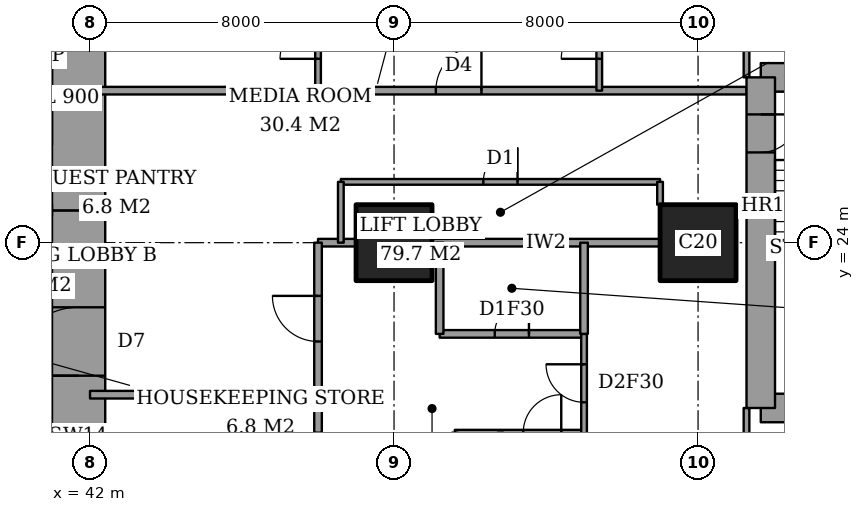
"""IFC4 building model, lengths in metres.
Left out: names, types, materials, properties, quantities, classifications, styles, units other than length and angle.
Written with IfcOpenShell. Run it as: python <this file> out.ifc"""

import sys

from ifc_helpers import new_model, si_unit, direction, frame, frame_2d, origin, origin_2d, place, context, subcontext, project, spatial, rectangle, extrude, element, fill, save


model = new_model("IFC4")
c1 = context("Model", 3, precision=1e-05, world=origin(), true_north=direction((0.0, 1.0)))
c2 = subcontext(c1, "Body", "Model", "MODEL_VIEW")
j1 = project(units=[si_unit("LENGTHUNIT", "METRE"), si_unit("PLANEANGLEUNIT", "RADIAN")], contexts=[c1])
p1 = place(None, origin())
s1 = spatial("IfcSite", under=j1, at=p1, CompositionType="ELEMENT")
p2 = place(p1, origin())
s2 = spatial("IfcBuilding", under=s1, at=p2, CompositionType="ELEMENT")
p3 = place(p2, frame((0.0, 0.0, 139.4)))
s3 = spatial("IfcBuildingStorey", under=s2, at=p3, CompositionType="ELEMENT", Elevation=139.4)
for number, where, z_axis, x_axis in (
    (1, (50.0, 24.0, 0.0), (0.0, 0.0, 1.0), (1.0, 0.0, 0.0)),
    (2, (58.0, 24.0, 0.0), (0.0, 0.0, 1.0), (1.0, 0.0, 0.0)),
):
    element("IfcColumn", number, at=place(p3, frame(where, z_axis=z_axis, x_axis=x_axis)), inside=s3, PredefinedType="COLUMN", context=c2, shape_type="SweptSolid", body=[
        extrude(rectangle(XDim=2.0, YDim=2.0, at=origin_2d()), origin(), (0.0, 0.0, 1.0), 3.6),
    ])
p4 = place(p3, frame((41.7, 13.0, 0.0), z_axis=(0.0, 0.0, 1.0), x_axis=(0.0, 1.0, 0.0)))
e3 = element("IfcWall", 3, at=p4, inside=s3, PredefinedType="SHEAR", context=c2, shape_type="SweptSolid", body=[
    extrude(rectangle(XDim=11.85, YDim=1.4, at=frame_2d((5.925, 0.0))), origin(), (0.0, 0.0, 1.0), 3.6),
])
p5 = place(p4, frame((7.5, 0.0, 0.0)))
e4 = element("IfcOpeningElement", 4, at=p5, cuts=e3, PredefinedType="OPENING", context=c2, shape_type="SweptSolid", body=[
    extrude(rectangle(XDim=1.8, YDim=2.4, at=frame_2d((0.9, 1.2))), frame((0.0, 0.71, 0.0), z_axis=(0.0, -1.0, 0.0), x_axis=(1.0, 0.0, 0.0)), (0.0, 0.0, 1.0), 1.42),
])
p6 = place(p3, frame((41.7, 24.85, 0.0), z_axis=(0.0, 0.0, 1.0), x_axis=(0.0, 1.0, 0.0)))
e5 = element("IfcWall", 5, at=p6, inside=s3, PredefinedType="SHEAR", context=c2, shape_type="SweptSolid", body=[
    extrude(rectangle(XDim=10.15, YDim=1.4, at=frame_2d((5.075, 0.0))), origin(), (0.0, 0.0, 1.0), 3.6),
])
for number, where, z_axis, x_axis in (
    (6, (59.65, 19.65, 0.0), (0.0, 0.0, 1.0), (1.0, 0.0, 0.0)),
    (7, (64.1, 28.35, 0.0), (0.0, 0.0, 1.0), (-1.0, 0.0, 0.0)),
):
    element("IfcWall", number, at=place(p3, frame(where, z_axis=z_axis, x_axis=x_axis)), inside=s3, PredefinedType="SHEAR", context=c2, shape_type="SweptSolid", body=[
        extrude(rectangle(XDim=4.45, YDim=0.75, at=frame_2d((2.225, 0.0))), origin(), (0.0, 0.0, 1.0), 3.6),
    ])
p7 = place(p3, frame((59.65, 28.35, 0.0), z_axis=(0.0, 0.0, 1.0), x_axis=(0.0, -1.0, 0.0)))
e8 = element("IfcWall", 8, at=p7, inside=s3, PredefinedType="SHEAR", context=c2, shape_type="SweptSolid", body=[
    extrude(rectangle(XDim=8.7, YDim=0.75, at=frame_2d((4.35, 0.0))), origin(), (0.0, 0.0, 1.0), 3.6),
])
p8 = place(p7, frame((0.975, 0.0, 0.0)))
e9 = element("IfcOpeningElement", 9, at=p8, cuts=e8, PredefinedType="OPENING", context=c2, shape_type="SweptSolid", body=[
    extrude(rectangle(XDim=1.0, YDim=2.1, at=frame_2d((0.5, 1.05))), frame((0.0, 0.385, 0.0), z_axis=(0.0, -1.0, 0.0), x_axis=(1.0, 0.0, 0.0)), (0.0, 0.0, 1.0), 0.77),
])
p9 = place(p3, frame((51.6, 19.0, 0.0), z_axis=(0.0, 0.0, 1.0), x_axis=(1.0, 0.0, 0.0)))
e10 = element("IfcWall", 10, at=p9, inside=s3, PredefinedType="PARTITIONING", context=c2, shape_type="SweptSolid", body=[
    extrude(rectangle(XDim=3.4, YDim=0.15, at=frame_2d((1.7, 0.0))), origin(), (0.0, 0.0, 1.0), 3.35),
])
p10 = place(p9, frame((1.8, 0.0, 0.0)))
e11 = element("IfcOpeningElement", 11, at=p10, cuts=e10, PredefinedType="OPENING", context=c2, shape_type="SweptSolid", body=[
    extrude(rectangle(XDim=1.0, YDim=2.1, at=frame_2d((0.5, 1.05))), frame((0.0, 0.085, 0.0), z_axis=(0.0, -1.0, 0.0), x_axis=(1.0, 0.0, 0.0)), (0.0, 0.0, 1.0), 0.17),
])
p11 = place(p3, frame((42.0, 20.0, 0.0), z_axis=(0.0, 0.0, 1.0), x_axis=(1.0, 0.0, 0.0)))
e12 = element("IfcWall", 12, at=p11, inside=s3, PredefinedType="PARTITIONING", context=c2, shape_type="SweptSolid", body=[
    extrude(rectangle(XDim=6.0, YDim=0.2, at=frame_2d((3.0, 0.0))), origin(), (0.0, 0.0, 1.0), 3.35),
])
p12 = place(p3, frame((51.2, 21.6, 0.0), z_axis=(0.0, 0.0, 1.0), x_axis=(1.0, 0.0, 0.0)))
e13 = element("IfcWall", 13, at=p12, inside=s3, PredefinedType="PARTITIONING", context=c2, shape_type="SweptSolid", body=[
    extrude(rectangle(XDim=3.8, YDim=0.2, at=frame_2d((1.9, 0.0))), origin(), (0.0, 0.0, 1.0), 3.35),
])
p13 = place(p12, frame((1.45, 0.0, 0.0)))
e14 = element("IfcOpeningElement", 14, at=p13, cuts=e13, PredefinedType="OPENING", context=c2, shape_type="SweptSolid", body=[
    extrude(rectangle(XDim=0.9, YDim=2.1, at=frame_2d((0.45, 1.05))), frame((0.0, 0.11, 0.0), z_axis=(0.0, -1.0, 0.0), x_axis=(1.0, 0.0, 0.0)), (0.0, 0.0, 1.0), 0.22),
])
p14 = place(p3, frame((48.0, 24.0, 0.0), z_axis=(0.0, 0.0, 1.0), x_axis=(1.0, 0.0, 0.0)))
e15 = element("IfcWall", 15, at=p14, inside=s3, PredefinedType="PARTITIONING", context=c2, shape_type="SweptSolid", body=[
    extrude(rectangle(XDim=1.0, YDim=0.2, at=frame_2d((0.5, 0.0))), origin(), (0.0, 0.0, 1.0), 3.35),
])
p15 = place(p3, frame((51.0, 24.0, 0.0), z_axis=(0.0, 0.0, 1.0), x_axis=(1.0, 0.0, 0.0)))
e16 = element("IfcWall", 16, at=p15, inside=s3, PredefinedType="PARTITIONING", context=c2, shape_type="SweptSolid", body=[
    extrude(rectangle(XDim=6.0, YDim=0.2, at=frame_2d((3.0, 0.0))), origin(), (0.0, 0.0, 1.0), 3.35),
])
p16 = place(p3, frame((48.6, 25.6, 0.0), z_axis=(0.0, 0.0, 1.0), x_axis=(1.0, 0.0, 0.0)))
e17 = element("IfcWall", 17, at=p16, inside=s3, PredefinedType="PARTITIONING", context=c2, shape_type="SweptSolid", body=[
    extrude(rectangle(XDim=8.4, YDim=0.15, at=frame_2d((4.2, 0.0))), origin(), (0.0, 0.0, 1.0), 3.35),
])
p17 = place(p16, frame((3.75, 0.0, 0.0)))
e18 = element("IfcOpeningElement", 18, at=p17, cuts=e17, PredefinedType="OPENING", context=c2, shape_type="SweptSolid", body=[
    extrude(rectangle(XDim=0.9, YDim=2.1, at=frame_2d((0.45, 1.05))), frame((0.0, 0.085, 0.0), z_axis=(0.0, -1.0, 0.0), x_axis=(1.0, 0.0, 0.0)), (0.0, 0.0, 1.0), 0.17),
])
p18 = place(p3, frame((42.0, 28.0, 0.0), z_axis=(0.0, 0.0, 1.0), x_axis=(1.0, 0.0, 0.0)))
e19 = element("IfcWall", 19, at=p18, inside=s3, PredefinedType="PARTITIONING", context=c2, shape_type="SweptSolid", body=[
    extrude(rectangle(XDim=17.275, YDim=0.2, at=frame_2d((8.637, 0.0))), origin(), (0.0, 0.0, 1.0), 3.35),
])
p19 = place(p18, frame((9.1, 0.0, 0.0)))
e20 = element("IfcOpeningElement", 20, at=p19, cuts=e19, PredefinedType="OPENING", context=c2, shape_type="SweptSolid", body=[
    extrude(rectangle(XDim=1.2, YDim=2.4, at=frame_2d((0.6, 1.2))), frame((0.0, 0.11, 0.0), z_axis=(0.0, -1.0, 0.0), x_axis=(1.0, 0.0, 0.0)), (0.0, 0.0, 1.0), 0.22),
])
p20 = place(p3, frame((48.0, 19.0, 0.0), z_axis=(0.0, 0.0, 1.0), x_axis=(0.0, 1.0, 0.0)))
e21 = element("IfcWall", 21, at=p20, inside=s3, PredefinedType="PARTITIONING", context=c2, shape_type="SweptSolid", body=[
    extrude(rectangle(XDim=5.0, YDim=0.2, at=frame_2d((2.5, 0.0))), origin(), (0.0, 0.0, 1.0), 3.35),
])
p21 = place(p20, frame((2.4, 0.0, 0.0)))
e22 = element("IfcOpeningElement", 22, at=p21, cuts=e21, PredefinedType="OPENING", context=c2, shape_type="SweptSolid", body=[
    extrude(rectangle(XDim=1.2, YDim=2.4, at=frame_2d((0.6, 1.2))), frame((0.0, 0.11, 0.0), z_axis=(0.0, -1.0, 0.0), x_axis=(1.0, 0.0, 0.0)), (0.0, 0.0, 1.0), 0.22),
])
p22 = place(p3, frame((48.0, 28.0, 0.0), z_axis=(0.0, 0.0, 1.0), x_axis=(0.0, 1.0, 0.0)))
e23 = element("IfcWall", 23, at=p22, inside=s3, PredefinedType="PARTITIONING", context=c2, shape_type="SweptSolid", body=[
    extrude(rectangle(XDim=9.4, YDim=0.15, at=frame_2d((4.7, 0.0))), origin(), (0.0, 0.0, 1.0), 3.35),
])
p23 = place(p22, frame((0.837, 0.0, 0.0)))
e24 = element("IfcOpeningElement", 24, at=p23, cuts=e23, PredefinedType="OPENING", context=c2, shape_type="SweptSolid", body=[
    extrude(rectangle(XDim=1.0, YDim=2.1, at=frame_2d((0.5, 1.05))), frame((0.0, 0.085, 0.0), z_axis=(0.0, -1.0, 0.0), x_axis=(1.0, 0.0, 0.0)), (0.0, 0.0, 1.0), 0.17),
])
p24 = place(p3, frame((48.6, 24.0, 0.0), z_axis=(0.0, 0.0, 1.0), x_axis=(0.0, 1.0, 0.0)))
e25 = element("IfcWall", 25, at=p24, inside=s3, PredefinedType="PARTITIONING", context=c2, shape_type="SweptSolid", body=[
    extrude(rectangle(XDim=1.6, YDim=0.15, at=frame_2d((0.8, 0.0))), origin(), (0.0, 0.0, 1.0), 3.35),
])
p25 = place(p3, frame((51.2, 21.6, 0.0), z_axis=(0.0, 0.0, 1.0), x_axis=(0.0, 1.0, 0.0)))
e26 = element("IfcWall", 26, at=p25, inside=s3, PredefinedType="PARTITIONING", context=c2, shape_type="SweptSolid", body=[
    extrude(rectangle(XDim=2.4, YDim=0.2, at=frame_2d((1.2, 0.0))), origin(), (0.0, 0.0, 1.0), 3.35),
])
p26 = place(p3, frame((51.6, 16.05, 0.0), z_axis=(0.0, 0.0, 1.0), x_axis=(0.0, 1.0, 0.0)))
e27 = element("IfcWall", 27, at=p26, inside=s3, PredefinedType="PARTITIONING", context=c2, shape_type="SweptSolid", body=[
    extrude(rectangle(XDim=2.95, YDim=0.15, at=frame_2d((1.475, 0.0))), origin(), (0.0, 0.0, 1.0), 3.35),
])
p27 = place(p3, frame((55.0, 21.6, 0.0), z_axis=(0.0, 0.0, 1.0), x_axis=(0.0, 1.0, 0.0)))
e28 = element("IfcWall", 28, at=p27, inside=s3, PredefinedType="PARTITIONING", context=c2, shape_type="SweptSolid", body=[
    extrude(rectangle(XDim=2.4, YDim=0.2, at=frame_2d((1.2, 0.0))), origin(), (0.0, 0.0, 1.0), 3.35),
])
p28 = place(p3, frame((55.0, 10.6, 0.0), z_axis=(0.0, 0.0, 1.0), x_axis=(0.0, 1.0, 0.0)))
e29 = element("IfcWall", 29, at=p28, inside=s3, PredefinedType="PARTITIONING", context=c2, shape_type="SweptSolid", body=[
    extrude(rectangle(XDim=11.0, YDim=0.15, at=frame_2d((5.5, 0.0))), origin(), (0.0, 0.0, 1.0), 3.35),
])
p29 = place(p28, frame((9.2, 0.0, 0.0)))
e30 = element("IfcOpeningElement", 30, at=p29, cuts=e29, PredefinedType="OPENING", context=c2, shape_type="SweptSolid", body=[
    extrude(rectangle(XDim=1.0, YDim=2.1, at=frame_2d((0.5, 1.05))), frame((0.0, 0.085, 0.0), z_axis=(0.0, -1.0, 0.0), x_axis=(1.0, 0.0, 0.0)), (0.0, 0.0, 1.0), 0.17),
])
p30 = place(p3, frame((55.4, 28.0, 0.0), z_axis=(0.0, 0.0, 1.0), x_axis=(0.0, 1.0, 0.0)))
e31 = element("IfcWall", 31, at=p30, inside=s3, PredefinedType="PARTITIONING", context=c2, shape_type="SweptSolid", body=[
    extrude(rectangle(XDim=9.4, YDim=0.15, at=frame_2d((4.7, 0.0))), origin(), (0.0, 0.0, 1.0), 3.35),
])
p31 = place(p30, frame((0.837, 0.0, 0.0)))
e32 = element("IfcOpeningElement", 32, at=p31, cuts=e31, PredefinedType="OPENING", context=c2, shape_type="SweptSolid", body=[
    extrude(rectangle(XDim=1.0, YDim=2.1, at=frame_2d((0.5, 1.05))), frame((0.0, 0.085, 0.0), z_axis=(0.0, -1.0, 0.0), x_axis=(1.0, 0.0, 0.0)), (0.0, 0.0, 1.0), 0.17),
])
p32 = place(p3, frame((57.0, 25.0, 0.0), z_axis=(0.0, 0.0, 1.0), x_axis=(0.0, 1.0, 0.0)))
e33 = element("IfcWall", 33, at=p32, inside=s3, PredefinedType="PARTITIONING", context=c2, shape_type="SweptSolid", body=[
    extrude(rectangle(XDim=0.6, YDim=0.15, at=frame_2d((0.3, 0.0))), origin(), (0.0, 0.0, 1.0), 3.35),
])
p33 = place(p3, frame((59.275, 17.2, 0.0), z_axis=(0.0, 0.0, 1.0), x_axis=(0.0, 1.0, 0.0)))
e34 = element("IfcWall", 34, at=p33, inside=s3, PredefinedType="PARTITIONING", context=c2, shape_type="SweptSolid", body=[
    extrude(rectangle(XDim=2.45, YDim=0.15, at=frame_2d((1.225, 0.0))), origin(), (0.0, 0.0, 1.0), 3.35),
])
p34 = place(p33, frame((0.538, 0.0, 0.0)))
e35 = element("IfcOpeningElement", 35, at=p34, cuts=e34, PredefinedType="OPENING", context=c2, shape_type="SweptSolid", body=[
    extrude(rectangle(XDim=1.0, YDim=2.1, at=frame_2d((0.5, 1.05))), frame((0.0, 0.085, 0.0), z_axis=(0.0, -1.0, 0.0), x_axis=(1.0, 0.0, 0.0)), (0.0, 0.0, 1.0), 0.17),
])
p35 = place(p3, frame((59.275, 28.35, 0.0), z_axis=(0.0, 0.0, 1.0), x_axis=(0.0, 1.0, 0.0)))
e36 = element("IfcWall", 36, at=p35, inside=s3, PredefinedType="PARTITIONING", context=c2, shape_type="SweptSolid", body=[
    extrude(rectangle(XDim=2.45, YDim=0.15, at=frame_2d((1.225, 0.0))), origin(), (0.0, 0.0, 1.0), 3.35),
])
p36 = place(p35, frame((0.913, 0.0, 0.0)))
e37 = element("IfcOpeningElement", 37, at=p36, cuts=e36, PredefinedType="OPENING", context=c2, shape_type="SweptSolid", body=[
    extrude(rectangle(XDim=1.0, YDim=2.1, at=frame_2d((0.5, 1.05))), frame((0.0, 0.085, 0.0), z_axis=(0.0, -1.0, 0.0), x_axis=(1.0, 0.0, 0.0)), (0.0, 0.0, 1.0), 0.17),
])
p37 = place(p29, origin())
e38 = element("IfcDoor", 38, at=p37, inside=s3, OperationType="SINGLE_SWING_LEFT", PredefinedType="DOOR", context=c2, shape_type="SweptSolid", body=[
    extrude(rectangle(XDim=1.0, YDim=2.1, at=frame_2d((0.5, 1.05))), frame((0.0, 0.025, 0.0), z_axis=(0.0, -1.0, 0.0), x_axis=(1.0, 0.0, 0.0)), (0.0, 0.0, 1.0), 0.05),
])
fill(e30, e38)
p38 = place(p13, origin())
e39 = element("IfcDoor", 39, at=p38, inside=s3, OperationType="SINGLE_SWING_LEFT", PredefinedType="DOOR", context=c2, shape_type="SweptSolid", body=[
    extrude(rectangle(XDim=0.9, YDim=2.1, at=frame_2d((0.45, 1.05))), frame((0.0, 0.025, 0.0), z_axis=(0.0, -1.0, 0.0), x_axis=(1.0, 0.0, 0.0)), (0.0, 0.0, 1.0), 0.05),
])
fill(e14, e39)
p39 = place(p21, origin())
e40 = element("IfcDoor", 40, at=p39, inside=s3, OperationType="SINGLE_SWING_LEFT", PredefinedType="DOOR", context=c2, shape_type="SweptSolid", body=[
    extrude(rectangle(XDim=1.2, YDim=2.4, at=frame_2d((0.6, 1.2))), frame((0.0, 0.025, 0.0), z_axis=(0.0, -1.0, 0.0), x_axis=(1.0, 0.0, 0.0)), (0.0, 0.0, 1.0), 0.05),
])
fill(e22, e40)
p40 = place(p10, origin())
e41 = element("IfcDoor", 41, at=p40, inside=s3, OperationType="SINGLE_SWING_LEFT", PredefinedType="DOOR", context=c2, shape_type="SweptSolid", body=[
    extrude(rectangle(XDim=1.0, YDim=2.1, at=frame_2d((0.5, 1.05))), frame((0.0, 0.025, 0.0), z_axis=(0.0, -1.0, 0.0), x_axis=(1.0, 0.0, 0.0)), (0.0, 0.0, 1.0), 0.05),
])
fill(e11, e41)
p41 = place(p31, origin())
e42 = element("IfcDoor", 42, at=p41, inside=s3, OperationType="SINGLE_SWING_RIGHT", PredefinedType="DOOR", context=c2, shape_type="SweptSolid", body=[
    extrude(rectangle(XDim=1.0, YDim=2.1, at=frame_2d((0.5, 1.05))), frame((0.0, 0.025, 0.0), z_axis=(0.0, -1.0, 0.0), x_axis=(1.0, 0.0, 0.0)), (0.0, 0.0, 1.0), 0.05),
])
fill(e32, e42)
p42 = place(p19, origin())
e43 = element("IfcDoor", 43, at=p42, inside=s3, OperationType="SINGLE_SWING_LEFT", PredefinedType="DOOR", context=c2, shape_type="SweptSolid", body=[
    extrude(rectangle(XDim=1.2, YDim=2.4, at=frame_2d((0.6, 1.2))), frame((0.0, 0.025, 0.0), z_axis=(0.0, -1.0, 0.0), x_axis=(1.0, 0.0, 0.0)), (0.0, 0.0, 1.0), 0.05),
])
fill(e20, e43)
p43 = place(p23, origin())
e44 = element("IfcDoor", 44, at=p43, inside=s3, OperationType="SINGLE_SWING_RIGHT", PredefinedType="DOOR", context=c2, shape_type="SweptSolid", body=[
    extrude(rectangle(XDim=1.0, YDim=2.1, at=frame_2d((0.5, 1.05))), frame((0.0, 0.025, 0.0), z_axis=(0.0, -1.0, 0.0), x_axis=(1.0, 0.0, 0.0)), (0.0, 0.0, 1.0), 0.05),
])
fill(e24, e44)
p44 = place(p17, origin())
e45 = element("IfcDoor", 45, at=p44, inside=s3, OperationType="SINGLE_SWING_LEFT", PredefinedType="DOOR", context=c2, shape_type="SweptSolid", body=[
    extrude(rectangle(XDim=0.9, YDim=2.1, at=frame_2d((0.45, 1.05))), frame((0.0, 0.025, 0.0), z_axis=(0.0, -1.0, 0.0), x_axis=(1.0, 0.0, 0.0)), (0.0, 0.0, 1.0), 0.05),
])
fill(e18, e45)
p45 = place(p5, origin())
e46 = element("IfcDoor", 46, at=p45, inside=s3, OperationType="DOUBLE_DOOR_DOUBLE_SWING", PredefinedType="DOOR", context=c2, shape_type="SweptSolid", body=[
    extrude(rectangle(XDim=1.8, YDim=2.4, at=frame_2d((0.9, 1.2))), frame((0.0, 0.025, 0.0), z_axis=(0.0, -1.0, 0.0), x_axis=(1.0, 0.0, 0.0)), (0.0, 0.0, 1.0), 0.05),
])
fill(e4, e46)
p46 = place(p8, origin())
e47 = element("IfcDoor", 47, at=p46, inside=s3, OperationType="SINGLE_SWING_RIGHT", PredefinedType="DOOR", context=c2, shape_type="SweptSolid", body=[
    extrude(rectangle(XDim=1.0, YDim=2.1, at=frame_2d((0.5, 1.05))), frame((0.0, 0.025, 0.0), z_axis=(0.0, -1.0, 0.0), x_axis=(1.0, 0.0, 0.0)), (0.0, 0.0, 1.0), 0.05),
])
fill(e9, e47)
save(model, sys.argv[1])
